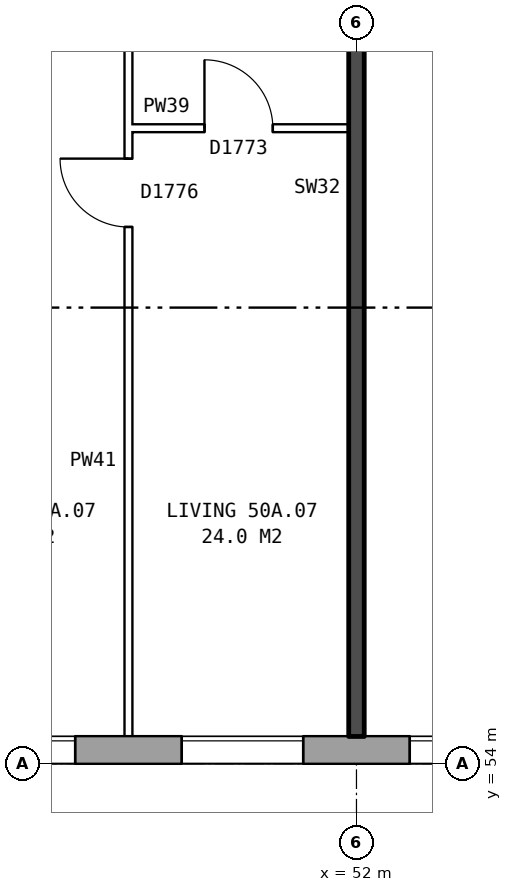
"""IFC4 building model, lengths in metres.
Left out: names, types, materials, properties, quantities, classifications, styles, units other than length and angle.
Written with IfcOpenShell. Run it as: python <this file> out.ifc"""

import sys

from ifc_helpers import new_model, si_unit, direction, frame, frame_2d, origin, place, context, subcontext, project, spatial, rectangle, extrude, element, fill, save


model = new_model("IFC4")
c1 = context("Model", 3, precision=1e-05, world=origin(), true_north=direction((0.0, 1.0)))
c2 = subcontext(c1, "Body", "Model", "MODEL_VIEW")
j1 = project(units=[si_unit("LENGTHUNIT", "METRE"), si_unit("PLANEANGLEUNIT", "RADIAN")], contexts=[c1])
p1 = place(None, origin())
s1 = spatial("IfcSite", under=j1, at=p1, CompositionType="ELEMENT")
p2 = place(p1, origin())
s2 = spatial("IfcBuilding", under=s1, at=p2, CompositionType="ELEMENT")
p3 = place(p2, frame((0.0, 0.0, 178.9)))
s3 = spatial("IfcBuildingStorey", under=s2, at=p3, CompositionType="ELEMENT", Elevation=178.9)
p4 = place(p3, frame((33.325, 54.18, 0.0), z_axis=(0.0, 0.0, 1.0), x_axis=(1.0, 0.0, 0.0)))
e1 = element("IfcWall", 1, at=p4, inside=s3, PredefinedType="STANDARD", context=c2, shape_type="SweptSolid", body=[
    extrude(rectangle(XDim=39.601, YDim=0.36, at=frame_2d((19.8, 0.0))), origin(), (0.0, 0.0, 1.0), 2.85),
])
p5 = place(p4, frame((1.375, 0.0, 0.8)))
e2 = element("IfcOpeningElement", 2, at=p5, cuts=e1, PredefinedType="OPENING", context=c2, shape_type="SweptSolid", body=[
    extrude(rectangle(XDim=1.6, YDim=1.8, at=frame_2d((0.8, 0.9))), frame((0.0, 0.19, 0.0), z_axis=(0.0, -1.0, 0.0), x_axis=(1.0, 0.0, 0.0)), (0.0, 0.0, 1.0), 0.38),
])
p6 = place(p4, frame((3.275, 0.0, 0.8)))
e3 = element("IfcOpeningElement", 3, at=p6, cuts=e1, PredefinedType="OPENING", context=c2, shape_type="SweptSolid", body=[
    extrude(rectangle(XDim=1.4, YDim=1.8, at=frame_2d((0.7, 0.9))), frame((0.0, 0.19, 0.0), z_axis=(0.0, -1.0, 0.0), x_axis=(1.0, 0.0, 0.0)), (0.0, 0.0, 1.0), 0.38),
])
p7 = place(p4, frame((7.375, 0.0, 0.8)))
e4 = element("IfcOpeningElement", 4, at=p7, cuts=e1, PredefinedType="OPENING", context=c2, shape_type="SweptSolid", body=[
    extrude(rectangle(XDim=1.6, YDim=1.8, at=frame_2d((0.8, 0.9))), frame((0.0, 0.19, 0.0), z_axis=(0.0, -1.0, 0.0), x_axis=(1.0, 0.0, 0.0)), (0.0, 0.0, 1.0), 0.38),
])
p8 = place(p4, frame((10.375, 0.0, 0.8)))
e5 = element("IfcOpeningElement", 5, at=p8, cuts=e1, PredefinedType="OPENING", context=c2, shape_type="SweptSolid", body=[
    extrude(rectangle(XDim=1.6, YDim=1.8, at=frame_2d((0.8, 0.9))), frame((0.0, 0.19, 0.0), z_axis=(0.0, -1.0, 0.0), x_axis=(1.0, 0.0, 0.0)), (0.0, 0.0, 1.0), 0.38),
])
p9 = place(p4, frame((13.375, 0.0, 0.8)))
e6 = element("IfcOpeningElement", 6, at=p9, cuts=e1, PredefinedType="OPENING", context=c2, shape_type="SweptSolid", body=[
    extrude(rectangle(XDim=1.6, YDim=1.8, at=frame_2d((0.8, 0.9))), frame((0.0, 0.19, 0.0), z_axis=(0.0, -1.0, 0.0), x_axis=(1.0, 0.0, 0.0)), (0.0, 0.0, 1.0), 0.38),
])
p10 = place(p4, frame((16.375, 0.0, 0.8)))
e7 = element("IfcOpeningElement", 7, at=p10, cuts=e1, PredefinedType="OPENING", context=c2, shape_type="SweptSolid", body=[
    extrude(rectangle(XDim=1.6, YDim=1.8, at=frame_2d((0.8, 0.9))), frame((0.0, 0.19, 0.0), z_axis=(0.0, -1.0, 0.0), x_axis=(1.0, 0.0, 0.0)), (0.0, 0.0, 1.0), 0.38),
])
p11 = place(p4, frame((19.375, 0.0, 0.8)))
e8 = element("IfcOpeningElement", 8, at=p11, cuts=e1, PredefinedType="OPENING", context=c2, shape_type="SweptSolid", body=[
    extrude(rectangle(XDim=1.6, YDim=1.8, at=frame_2d((0.8, 0.9))), frame((0.0, 0.19, 0.0), z_axis=(0.0, -1.0, 0.0), x_axis=(1.0, 0.0, 0.0)), (0.0, 0.0, 1.0), 0.38),
])
p12 = place(p4, frame((22.375, 0.0, 0.8)))
e9 = element("IfcOpeningElement", 9, at=p12, cuts=e1, PredefinedType="OPENING", context=c2, shape_type="SweptSolid", body=[
    extrude(rectangle(XDim=1.6, YDim=1.8, at=frame_2d((0.8, 0.9))), frame((0.0, 0.19, 0.0), z_axis=(0.0, -1.0, 0.0), x_axis=(1.0, 0.0, 0.0)), (0.0, 0.0, 1.0), 0.38),
])
p13 = place(p4, frame((25.375, 0.0, 0.8)))
e10 = element("IfcOpeningElement", 10, at=p13, cuts=e1, PredefinedType="OPENING", context=c2, shape_type="SweptSolid", body=[
    extrude(rectangle(XDim=1.6, YDim=1.8, at=frame_2d((0.8, 0.9))), frame((0.0, 0.19, 0.0), z_axis=(0.0, -1.0, 0.0), x_axis=(1.0, 0.0, 0.0)), (0.0, 0.0, 1.0), 0.38),
])
p14 = place(p4, frame((28.375, 0.0, 0.8)))
e11 = element("IfcOpeningElement", 11, at=p14, cuts=e1, PredefinedType="OPENING", context=c2, shape_type="SweptSolid", body=[
    extrude(rectangle(XDim=1.6, YDim=1.8, at=frame_2d((0.8, 0.9))), frame((0.0, 0.19, 0.0), z_axis=(0.0, -1.0, 0.0), x_axis=(1.0, 0.0, 0.0)), (0.0, 0.0, 1.0), 0.38),
])
p15 = place(p4, frame((30.875, 0.0, 0.8)))
e12 = element("IfcOpeningElement", 12, at=p15, cuts=e1, PredefinedType="OPENING", context=c2, shape_type="SweptSolid", body=[
    extrude(rectangle(XDim=1.0, YDim=1.8, at=frame_2d((0.5, 0.9))), frame((0.0, 0.19, 0.0), z_axis=(0.0, -1.0, 0.0), x_axis=(1.0, 0.0, 0.0)), (0.0, 0.0, 1.0), 0.38),
])
p16 = place(p4, frame((32.175, 0.0, 0.8)))
e13 = element("IfcOpeningElement", 13, at=p16, cuts=e1, PredefinedType="OPENING", context=c2, shape_type="SweptSolid", body=[
    extrude(rectangle(XDim=0.6, YDim=0.9, at=frame_2d((0.3, 0.45))), frame((0.0, 0.19, 0.0), z_axis=(0.0, -1.0, 0.0), x_axis=(1.0, 0.0, 0.0)), (0.0, 0.0, 1.0), 0.38),
])
p17 = place(p4, frame((37.375, 0.0, 0.8)))
e14 = element("IfcOpeningElement", 14, at=p17, cuts=e1, PredefinedType="OPENING", context=c2, shape_type="SweptSolid", body=[
    extrude(rectangle(XDim=1.6, YDim=1.8, at=frame_2d((0.8, 0.9))), frame((0.0, 0.19, 0.0), z_axis=(0.0, -1.0, 0.0), x_axis=(1.0, 0.0, 0.0)), (0.0, 0.0, 1.0), 0.38),
])
p18 = place(p4, frame((4.975, 0.0, 1.6)))
e15 = element("IfcOpeningElement", 15, at=p18, cuts=e1, PredefinedType="OPENING", context=c2, shape_type="SweptSolid", body=[
    extrude(rectangle(XDim=0.6, YDim=0.9, at=frame_2d((0.3, 0.45))), frame((0.0, 0.19, 0.0), z_axis=(0.0, -1.0, 0.0), x_axis=(1.0, 0.0, 0.0)), (0.0, 0.0, 1.0), 0.38),
])
p19 = place(p4, frame((33.925, 0.0, 1.7)))
e16 = element("IfcOpeningElement", 16, at=p19, cuts=e1, PredefinedType="OPENING", context=c2, shape_type="SweptSolid", body=[
    extrude(rectangle(XDim=0.6, YDim=0.9, at=frame_2d((0.3, 0.45))), frame((0.0, 0.19, 0.0), z_axis=(0.0, -1.0, 0.0), x_axis=(1.0, 0.0, 0.0)), (0.0, 0.0, 1.0), 0.38),
])
p20 = place(p4, frame((34.825, 0.0, 0.8)))
e17 = element("IfcOpeningElement", 17, at=p20, cuts=e1, PredefinedType="OPENING", context=c2, shape_type="SweptSolid", body=[
    extrude(rectangle(XDim=1.6, YDim=1.8, at=frame_2d((0.8, 0.9))), frame((0.0, 0.19, 0.0), z_axis=(0.0, -1.0, 0.0), x_axis=(1.0, 0.0, 0.0)), (0.0, 0.0, 1.0), 0.38),
])
p21 = place(p3, frame((49.0, 62.36, 0.0), z_axis=(0.0, 0.0, 1.0), x_axis=(1.0, 0.0, 0.0)))
e18 = element("IfcWall", 18, at=p21, inside=s3, PredefinedType="PARTITIONING", context=c2, shape_type="SweptSolid", body=[
    extrude(rectangle(XDim=2.9, YDim=0.1, at=frame_2d((1.45, 0.0))), origin(), (0.0, 0.0, 1.0), 2.85),
])
p22 = place(p21, frame((1.0, 0.0, 0.0)))
e19 = element("IfcOpeningElement", 19, at=p22, cuts=e18, PredefinedType="OPENING", context=c2, shape_type="SweptSolid", body=[
    extrude(rectangle(XDim=0.9, YDim=2.1, at=frame_2d((0.45, 1.05))), frame((0.0, 0.06, 0.0), z_axis=(0.0, -1.0, 0.0), x_axis=(1.0, 0.0, 0.0)), (0.0, 0.0, 1.0), 0.12),
])
p23 = place(p3, frame((49.0, 54.36, 0.0), z_axis=(0.0, 0.0, 1.0), x_axis=(0.0, 1.0, 0.0)))
e20 = element("IfcWall", 20, at=p23, inside=s3, PredefinedType="PARTITIONING", context=c2, shape_type="SweptSolid", body=[
    extrude(rectangle(XDim=14.34, YDim=0.1, at=frame_2d((7.17, 0.0))), origin(), (0.0, 0.0, 1.0), 2.85),
])
p24 = place(p23, frame((6.7, 0.0, 0.0)))
e21 = element("IfcOpeningElement", 21, at=p24, cuts=e20, PredefinedType="OPENING", context=c2, shape_type="SweptSolid", body=[
    extrude(rectangle(XDim=0.9, YDim=2.1, at=frame_2d((0.45, 1.05))), frame((0.0, 0.06, 0.0), z_axis=(0.0, -1.0, 0.0), x_axis=(1.0, 0.0, 0.0)), (0.0, 0.0, 1.0), 0.12),
])
p25 = place(p23, frame((13.04, 0.0, 0.0)))
e22 = element("IfcOpeningElement", 22, at=p25, cuts=e20, PredefinedType="OPENING", context=c2, shape_type="SweptSolid", body=[
    extrude(rectangle(XDim=0.9, YDim=2.1, at=frame_2d((0.45, 1.05))), frame((0.0, 0.06, 0.0), z_axis=(0.0, -1.0, 0.0), x_axis=(1.0, 0.0, 0.0)), (0.0, 0.0, 1.0), 0.12),
])
p26 = place(p3, frame((52.0, 54.36, 0.0), z_axis=(0.0, 0.0, 1.0), x_axis=(0.0, 1.0, 0.0)))
e23 = element("IfcWall", 23, at=p26, inside=s3, PredefinedType="SOLIDWALL", context=c2, shape_type="SweptSolid", body=[
    extrude(rectangle(XDim=14.44, YDim=0.2, at=frame_2d((7.22, 0.0))), origin(), (0.0, 0.0, 1.0), 2.85),
])
p27 = place(p9, origin())
e24 = element("IfcWindow", 24, at=p27, inside=s3, PartitioningType="SINGLE_PANEL", PredefinedType="WINDOW", context=c2, shape_type="SweptSolid", body=[
    extrude(rectangle(XDim=1.6, YDim=1.8, at=frame_2d((0.8, 0.9))), frame((0.0, 0.15, 0.0), z_axis=(0.0, -1.0, 0.0), x_axis=(1.0, 0.0, 0.0)), (0.0, 0.0, 1.0), 0.06),
])
fill(e6, e24)
p28 = place(p10, origin())
e25 = element("IfcWindow", 25, at=p28, inside=s3, PartitioningType="SINGLE_PANEL", PredefinedType="WINDOW", context=c2, shape_type="SweptSolid", body=[
    extrude(rectangle(XDim=1.6, YDim=1.8, at=frame_2d((0.8, 0.9))), frame((0.0, 0.15, 0.0), z_axis=(0.0, -1.0, 0.0), x_axis=(1.0, 0.0, 0.0)), (0.0, 0.0, 1.0), 0.06),
])
fill(e7, e25)
p29 = place(p11, origin())
e26 = element("IfcWindow", 26, at=p29, inside=s3, PartitioningType="SINGLE_PANEL", PredefinedType="WINDOW", context=c2, shape_type="SweptSolid", body=[
    extrude(rectangle(XDim=1.6, YDim=1.8, at=frame_2d((0.8, 0.9))), frame((0.0, 0.15, 0.0), z_axis=(0.0, -1.0, 0.0), x_axis=(1.0, 0.0, 0.0)), (0.0, 0.0, 1.0), 0.06),
])
fill(e8, e26)
p30 = place(p24, origin())
e27 = element("IfcDoor", 27, at=p30, inside=s3, OperationType="SINGLE_SWING_RIGHT", PredefinedType="DOOR", context=c2, shape_type="SweptSolid", body=[
    extrude(rectangle(XDim=0.9, YDim=2.1, at=frame_2d((0.45, 1.05))), frame((0.0, 0.025, 0.0), z_axis=(0.0, -1.0, 0.0), x_axis=(1.0, 0.0, 0.0)), (0.0, 0.0, 1.0), 0.05),
])
fill(e21, e27)
p31 = place(p22, origin())
e28 = element("IfcDoor", 28, at=p31, inside=s3, OperationType="SINGLE_SWING_LEFT", PredefinedType="DOOR", context=c2, shape_type="SweptSolid", body=[
    extrude(rectangle(XDim=0.9, YDim=2.1, at=frame_2d((0.45, 1.05))), frame((0.0, 0.025, 0.0), z_axis=(0.0, -1.0, 0.0), x_axis=(1.0, 0.0, 0.0)), (0.0, 0.0, 1.0), 0.05),
])
fill(e19, e28)
save(model, sys.argv[1])
